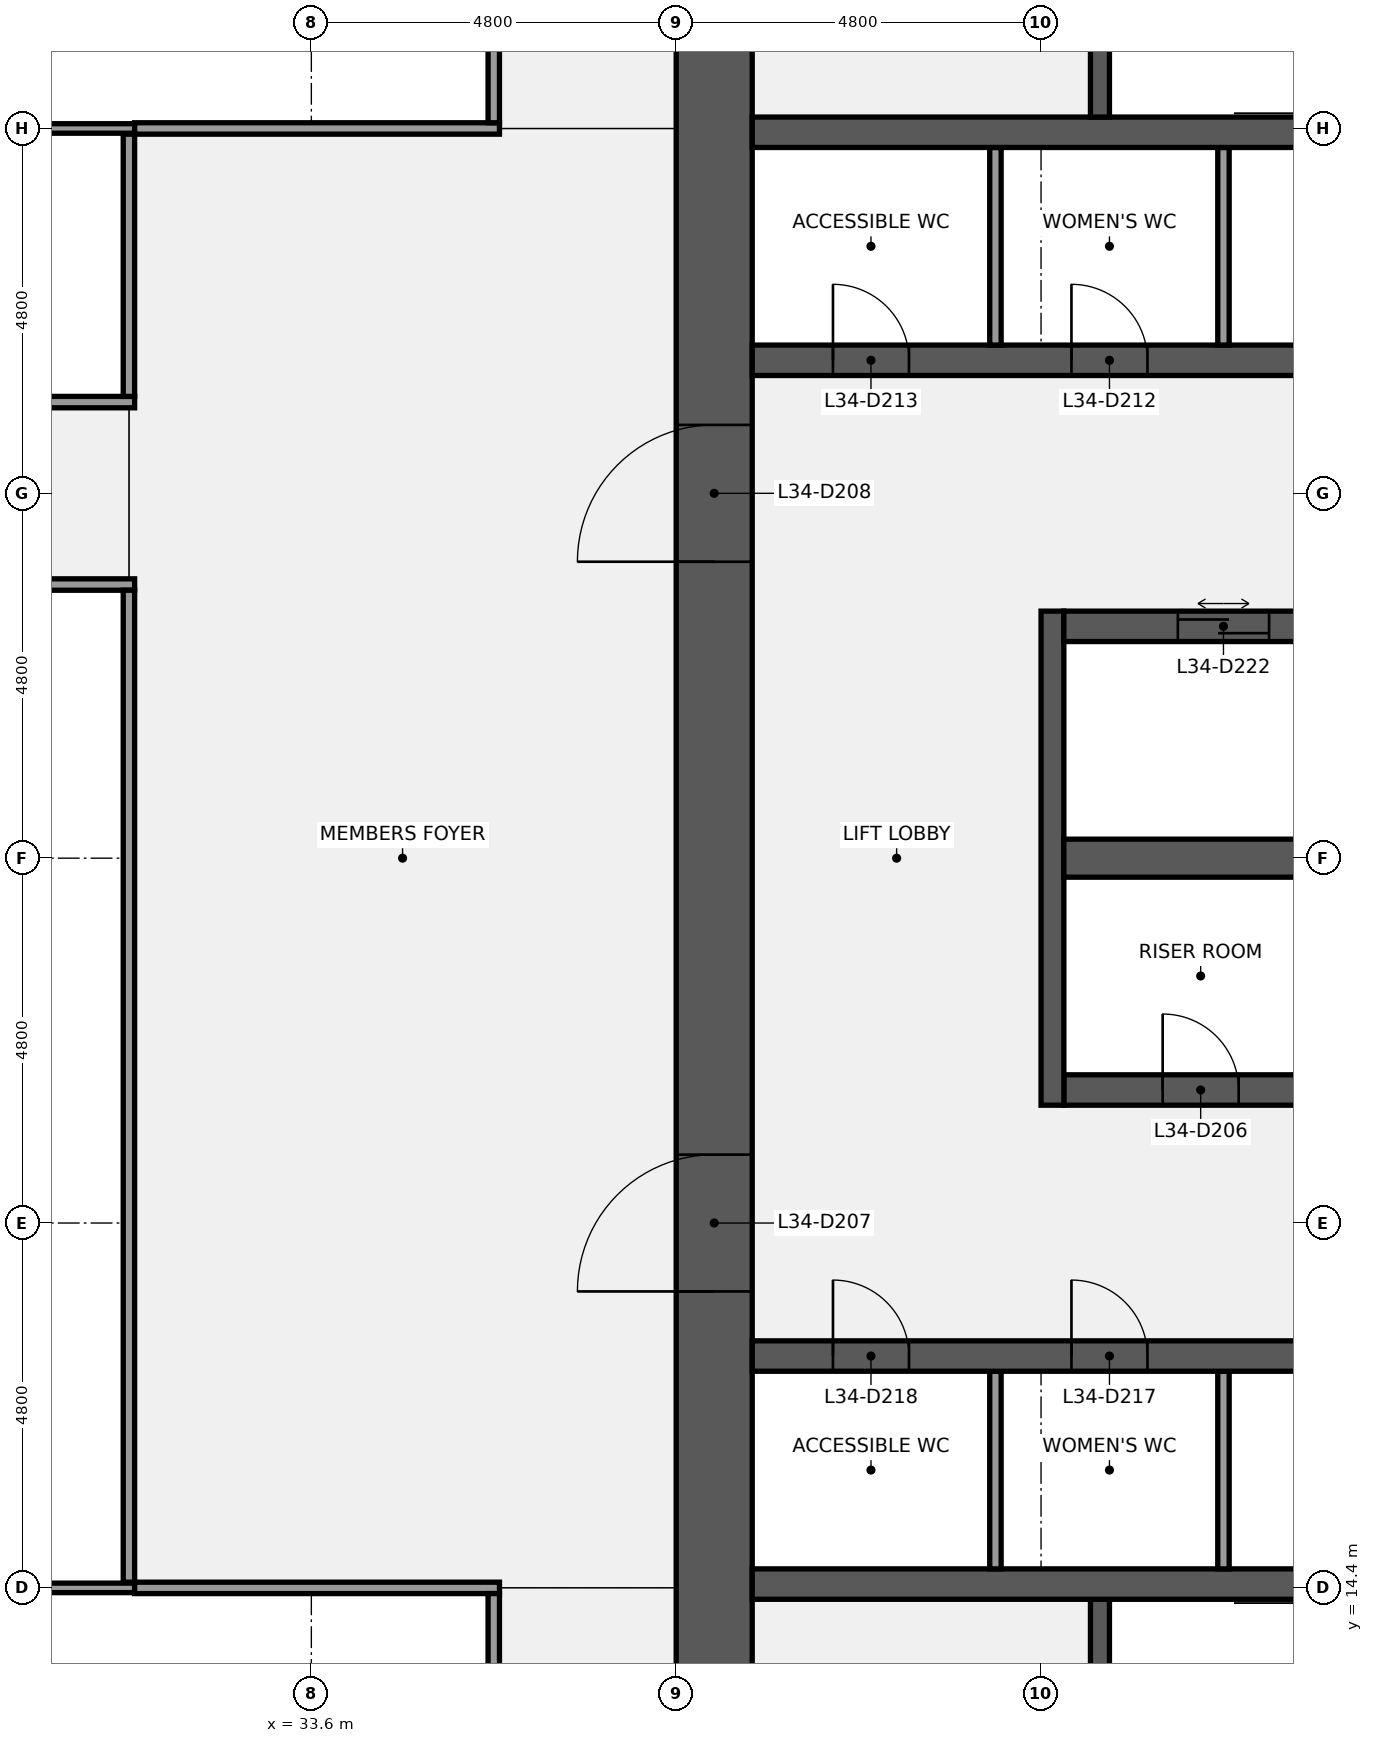
"""IFC4 building model, lengths in metres.
Left out: names, types, materials, properties, quantities, classifications, styles, units other than length and angle.
Written with IfcOpenShell. Run it as: python <this file> out.ifc"""

import sys

from ifc_helpers import new_model, si_unit, direction, frame, frame_2d, origin, place, context, subcontext, project, spatial, rectangle, extrude, element, fill, save


model = new_model("IFC4")
c1 = context("Model", 3, precision=1e-05, world=origin(), true_north=direction((0.0, 1.0)))
c2 = subcontext(c1, "Body", "Model", "MODEL_VIEW")
j1 = project(units=[si_unit("LENGTHUNIT", "METRE"), si_unit("PLANEANGLEUNIT", "RADIAN")], contexts=[c1])
p1 = place(None, origin())
s1 = spatial("IfcSite", under=j1, at=p1, CompositionType="ELEMENT")
p2 = place(p1, origin())
s2 = spatial("IfcBuilding", under=s1, at=p2, CompositionType="ELEMENT")
p3 = place(p2, frame((0.0, 0.0, 156.1)))
s3 = spatial("IfcBuildingStorey", under=s2, at=p3, CompositionType="ELEMENT", Elevation=156.1)
p4 = place(p3, frame((38.9, 9.6, 0.0), z_axis=(0.0, 0.0, 1.0), x_axis=(0.0, 1.0, 0.0)))
e1 = element("IfcWall", 1, at=p4, inside=s3, PredefinedType="SHEAR", context=c2, shape_type="SweptSolid", body=[
    extrude(rectangle(XDim=28.8, YDim=1.0, at=frame_2d((14.4, 0.0))), origin(), (0.0, 0.0, 1.0), 3.84),
])
p5 = place(p4, frame((8.7, 0.0, 0.0)))
e2 = element("IfcOpeningElement", 2, at=p5, cuts=e1, PredefinedType="OPENING", context=c2, shape_type="SweptSolid", body=[
    extrude(rectangle(XDim=1.8, YDim=2.1, at=frame_2d((0.9, 1.05))), frame((0.0, 0.51, 0.0), z_axis=(0.0, -1.0, 0.0), x_axis=(1.0, 0.0, 0.0)), (0.0, 0.0, 1.0), 1.02),
])
p6 = place(p4, frame((18.3, 0.0, 0.0)))
e3 = element("IfcOpeningElement", 3, at=p6, cuts=e1, PredefinedType="OPENING", context=c2, shape_type="SweptSolid", body=[
    extrude(rectangle(XDim=1.8, YDim=2.1, at=frame_2d((0.9, 1.05))), frame((0.0, 0.51, 0.0), z_axis=(0.0, -1.0, 0.0), x_axis=(1.0, 0.0, 0.0)), (0.0, 0.0, 1.0), 1.02),
])
p7 = place(p3, frame((43.975, 10.8, 0.0), z_axis=(0.0, 0.0, 1.0), x_axis=(0.0, 1.0, 0.0)))
e4 = element("IfcWall", 4, at=p7, inside=s3, PredefinedType="SHEAR", context=c2, shape_type="SweptSolid", body=[
    extrude(rectangle(XDim=3.45, YDim=0.25, at=frame_2d((1.725, 0.0))), origin(), (0.0, 0.0, 1.0), 3.84),
])
p8 = place(p7, frame((1.175, 0.0, 0.0)))
e5 = element("IfcOpeningElement", 5, at=p8, cuts=e4, PredefinedType="OPENING", context=c2, shape_type="SweptSolid", body=[
    extrude(rectangle(XDim=1.1, YDim=2.1, at=frame_2d((0.55, 1.05))), frame((0.0, 0.135, 0.0), z_axis=(0.0, -1.0, 0.0), x_axis=(1.0, 0.0, 0.0)), (0.0, 0.0, 1.0), 0.27),
])
p9 = place(p3, frame((39.4, 14.45, 0.0), z_axis=(0.0, 0.0, 1.0), x_axis=(1.0, 0.0, 0.0)))
e6 = element("IfcWall", 6, at=p9, inside=s3, PredefinedType="SHEAR", context=c2, shape_type="SweptSolid", body=[
    extrude(rectangle(XDim=17.2, YDim=0.4, at=frame_2d((8.6, 0.0))), origin(), (0.0, 0.0, 1.0), 3.84),
])
for number, where, z_axis, x_axis in (
    (7, (45.6, 14.65, 0.0), (0.0, 0.0, 1.0), (0.0, 1.0, 0.0)),
    (8, (42.6, 14.65, 0.0), (0.0, 0.0, 1.0), (0.0, 1.0, 0.0)),
):
    element("IfcWall", number, at=place(p3, frame(where, z_axis=z_axis, x_axis=x_axis)), inside=s3, PredefinedType="PARTITIONING", context=c2, shape_type="SweptSolid", body=[
        extrude(rectangle(XDim=2.6, YDim=0.15, at=frame_2d((1.3, 0.0))), origin(), (0.0, 0.0, 1.0), 3.84),
    ])
p10 = place(p3, frame((39.4, 17.45, 0.0), z_axis=(0.0, 0.0, 1.0), x_axis=(1.0, 0.0, 0.0)))
e9 = element("IfcWall", 9, at=p10, inside=s3, PredefinedType="SHEAR", context=c2, shape_type="SweptSolid", body=[
    extrude(rectangle(XDim=17.2, YDim=0.4, at=frame_2d((8.6, 0.0))), origin(), (0.0, 0.0, 1.0), 3.84),
])
p11 = place(p10, frame((15.438, 0.0, 0.0)))
e10 = element("IfcOpeningElement", 10, at=p11, cuts=e9, PredefinedType="OPENING", context=c2, shape_type="SweptSolid", body=[
    extrude(rectangle(XDim=1.0, YDim=2.1, at=frame_2d((0.5, 1.05))), frame((0.0, 0.21, 0.0), z_axis=(0.0, -1.0, 0.0), x_axis=(1.0, 0.0, 0.0)), (0.0, 0.0, 1.0), 0.42),
])
p12 = place(p10, frame((12.9, 0.0, 0.0)))
e11 = element("IfcOpeningElement", 11, at=p12, cuts=e9, PredefinedType="OPENING", context=c2, shape_type="SweptSolid", body=[
    extrude(rectangle(XDim=1.0, YDim=2.1, at=frame_2d((0.5, 1.05))), frame((0.0, 0.21, 0.0), z_axis=(0.0, -1.0, 0.0), x_axis=(1.0, 0.0, 0.0)), (0.0, 0.0, 1.0), 0.42),
])
p13 = place(p10, frame((8.7, 0.0, 0.0)))
e12 = element("IfcOpeningElement", 12, at=p13, cuts=e9, PredefinedType="OPENING", context=c2, shape_type="SweptSolid", body=[
    extrude(rectangle(XDim=1.0, YDim=2.1, at=frame_2d((0.5, 1.05))), frame((0.0, 0.21, 0.0), z_axis=(0.0, -1.0, 0.0), x_axis=(1.0, 0.0, 0.0)), (0.0, 0.0, 1.0), 0.42),
])
p14 = place(p10, frame((4.2, 0.0, 0.0)))
e13 = element("IfcOpeningElement", 13, at=p14, cuts=e9, PredefinedType="OPENING", context=c2, shape_type="SweptSolid", body=[
    extrude(rectangle(XDim=1.0, YDim=2.1, at=frame_2d((0.5, 1.05))), frame((0.0, 0.21, 0.0), z_axis=(0.0, -1.0, 0.0), x_axis=(1.0, 0.0, 0.0)), (0.0, 0.0, 1.0), 0.42),
])
p15 = place(p10, frame((1.062, 0.0, 0.0)))
e14 = element("IfcOpeningElement", 14, at=p15, cuts=e9, PredefinedType="OPENING", context=c2, shape_type="SweptSolid", body=[
    extrude(rectangle(XDim=1.0, YDim=2.1, at=frame_2d((0.5, 1.05))), frame((0.0, 0.21, 0.0), z_axis=(0.0, -1.0, 0.0), x_axis=(1.0, 0.0, 0.0)), (0.0, 0.0, 1.0), 0.42),
])
p16 = place(p3, frame((43.5, 20.95, 0.0), z_axis=(0.0, 0.0, 1.0), x_axis=(1.0, 0.0, 0.0)))
e15 = element("IfcWall", 15, at=p16, inside=s3, PredefinedType="SHEAR", context=c2, shape_type="SweptSolid", body=[
    extrude(rectangle(XDim=13.1, YDim=0.4, at=frame_2d((6.55, 0.0))), origin(), (0.0, 0.0, 1.0), 3.84),
])
p17 = place(p16, frame((6.15, 0.0, 0.0)))
e16 = element("IfcOpeningElement", 16, at=p17, cuts=e15, PredefinedType="OPENING", context=c2, shape_type="SweptSolid", body=[
    extrude(rectangle(XDim=1.1, YDim=2.1, at=frame_2d((0.55, 1.05))), frame((0.0, 0.21, 0.0), z_axis=(0.0, -1.0, 0.0), x_axis=(1.0, 0.0, 0.0)), (0.0, 0.0, 1.0), 0.42),
])
p18 = place(p16, frame((1.3, 0.0, 0.0)))
e17 = element("IfcOpeningElement", 17, at=p18, cuts=e15, PredefinedType="OPENING", context=c2, shape_type="SweptSolid", body=[
    extrude(rectangle(XDim=1.0, YDim=2.1, at=frame_2d((0.5, 1.05))), frame((0.0, 0.21, 0.0), z_axis=(0.0, -1.0, 0.0), x_axis=(1.0, 0.0, 0.0)), (0.0, 0.0, 1.0), 0.42),
])
p19 = place(p3, frame((43.35, 20.75, 0.0), z_axis=(0.0, 0.0, 1.0), x_axis=(0.0, 1.0, 0.0)))
e18 = element("IfcWall", 18, at=p19, inside=s3, PredefinedType="SHEAR", context=c2, shape_type="SweptSolid", body=[
    extrude(rectangle(XDim=6.5, YDim=0.3, at=frame_2d((3.25, 0.0))), origin(), (0.0, 0.0, 1.0), 3.84),
])
p20 = place(p3, frame((43.5, 24.0, 0.0), z_axis=(0.0, 0.0, 1.0), x_axis=(1.0, 0.0, 0.0)))
e19 = element("IfcWall", 19, at=p20, inside=s3, PredefinedType="SHEAR", context=c2, shape_type="SweptSolid", body=[
    extrude(rectangle(XDim=13.1, YDim=0.5, at=frame_2d((6.55, 0.0))), origin(), (0.0, 0.0, 1.0), 3.84),
])
p21 = place(p3, frame((43.5, 27.05, 0.0), z_axis=(0.0, 0.0, 1.0), x_axis=(1.0, 0.0, 0.0)))
e20 = element("IfcWall", 20, at=p21, inside=s3, PredefinedType="SHEAR", context=c2, shape_type="SweptSolid", body=[
    extrude(rectangle(XDim=13.1, YDim=0.4, at=frame_2d((6.55, 0.0))), origin(), (0.0, 0.0, 1.0), 3.84),
])
p22 = place(p21, frame((10.7, 0.0, 0.0)))
e21 = element("IfcOpeningElement", 21, at=p22, cuts=e20, PredefinedType="OPENING", context=c2, shape_type="SweptSolid", body=[
    extrude(rectangle(XDim=1.2, YDim=2.1, at=frame_2d((0.6, 1.05))), frame((0.0, 0.21, 0.0), z_axis=(0.0, -1.0, 0.0), x_axis=(1.0, 0.0, 0.0)), (0.0, 0.0, 1.0), 0.42),
])
p23 = place(p21, frame((8.1, 0.0, 0.0)))
e22 = element("IfcOpeningElement", 22, at=p23, cuts=e20, PredefinedType="OPENING", context=c2, shape_type="SweptSolid", body=[
    extrude(rectangle(XDim=1.2, YDim=2.1, at=frame_2d((0.6, 1.05))), frame((0.0, 0.21, 0.0), z_axis=(0.0, -1.0, 0.0), x_axis=(1.0, 0.0, 0.0)), (0.0, 0.0, 1.0), 0.42),
])
p24 = place(p21, frame((5.5, 0.0, 0.0)))
e23 = element("IfcOpeningElement", 23, at=p24, cuts=e20, PredefinedType="OPENING", context=c2, shape_type="SweptSolid", body=[
    extrude(rectangle(XDim=1.2, YDim=2.1, at=frame_2d((0.6, 1.05))), frame((0.0, 0.21, 0.0), z_axis=(0.0, -1.0, 0.0), x_axis=(1.0, 0.0, 0.0)), (0.0, 0.0, 1.0), 0.42),
])
p25 = place(p21, frame((1.5, 0.0, 0.0)))
e24 = element("IfcOpeningElement", 24, at=p25, cuts=e20, PredefinedType="OPENING", context=c2, shape_type="SweptSolid", body=[
    extrude(rectangle(XDim=1.2, YDim=2.1, at=frame_2d((0.6, 1.05))), frame((0.0, 0.21, 0.0), z_axis=(0.0, -1.0, 0.0), x_axis=(1.0, 0.0, 0.0)), (0.0, 0.0, 1.0), 0.42),
])
p26 = place(p3, frame((39.4, 30.55, 0.0), z_axis=(0.0, 0.0, 1.0), x_axis=(1.0, 0.0, 0.0)))
e25 = element("IfcWall", 25, at=p26, inside=s3, PredefinedType="SHEAR", context=c2, shape_type="SweptSolid", body=[
    extrude(rectangle(XDim=17.2, YDim=0.4, at=frame_2d((8.6, 0.0))), origin(), (0.0, 0.0, 1.0), 3.84),
])
p27 = place(p26, frame((15.438, 0.0, 0.0)))
e26 = element("IfcOpeningElement", 26, at=p27, cuts=e25, PredefinedType="OPENING", context=c2, shape_type="SweptSolid", body=[
    extrude(rectangle(XDim=1.0, YDim=2.1, at=frame_2d((0.5, 1.05))), frame((0.0, 0.21, 0.0), z_axis=(0.0, -1.0, 0.0), x_axis=(1.0, 0.0, 0.0)), (0.0, 0.0, 1.0), 0.42),
])
p28 = place(p26, frame((12.9, 0.0, 0.0)))
e27 = element("IfcOpeningElement", 27, at=p28, cuts=e25, PredefinedType="OPENING", context=c2, shape_type="SweptSolid", body=[
    extrude(rectangle(XDim=1.0, YDim=2.1, at=frame_2d((0.5, 1.05))), frame((0.0, 0.21, 0.0), z_axis=(0.0, -1.0, 0.0), x_axis=(1.0, 0.0, 0.0)), (0.0, 0.0, 1.0), 0.42),
])
p29 = place(p26, frame((8.7, 0.0, 0.0)))
e28 = element("IfcOpeningElement", 28, at=p29, cuts=e25, PredefinedType="OPENING", context=c2, shape_type="SweptSolid", body=[
    extrude(rectangle(XDim=1.0, YDim=2.1, at=frame_2d((0.5, 1.05))), frame((0.0, 0.21, 0.0), z_axis=(0.0, -1.0, 0.0), x_axis=(1.0, 0.0, 0.0)), (0.0, 0.0, 1.0), 0.42),
])
p30 = place(p26, frame((4.2, 0.0, 0.0)))
e29 = element("IfcOpeningElement", 29, at=p30, cuts=e25, PredefinedType="OPENING", context=c2, shape_type="SweptSolid", body=[
    extrude(rectangle(XDim=1.0, YDim=2.1, at=frame_2d((0.5, 1.05))), frame((0.0, 0.21, 0.0), z_axis=(0.0, -1.0, 0.0), x_axis=(1.0, 0.0, 0.0)), (0.0, 0.0, 1.0), 0.42),
])
p31 = place(p26, frame((1.062, 0.0, 0.0)))
e30 = element("IfcOpeningElement", 30, at=p31, cuts=e25, PredefinedType="OPENING", context=c2, shape_type="SweptSolid", body=[
    extrude(rectangle(XDim=1.0, YDim=2.1, at=frame_2d((0.5, 1.05))), frame((0.0, 0.21, 0.0), z_axis=(0.0, -1.0, 0.0), x_axis=(1.0, 0.0, 0.0)), (0.0, 0.0, 1.0), 0.42),
])
for number, where, z_axis, x_axis in (
    (31, (45.6, 30.75, 0.0), (0.0, 0.0, 1.0), (0.0, 1.0, 0.0)),
    (32, (42.6, 30.75, 0.0), (0.0, 0.0, 1.0), (0.0, 1.0, 0.0)),
):
    element("IfcWall", number, at=place(p3, frame(where, z_axis=z_axis, x_axis=x_axis)), inside=s3, PredefinedType="PARTITIONING", context=c2, shape_type="SweptSolid", body=[
        extrude(rectangle(XDim=2.6, YDim=0.15, at=frame_2d((1.3, 0.0))), origin(), (0.0, 0.0, 1.0), 3.84),
    ])
p32 = place(p3, frame((39.4, 33.55, 0.0), z_axis=(0.0, 0.0, 1.0), x_axis=(1.0, 0.0, 0.0)))
e33 = element("IfcWall", 33, at=p32, inside=s3, PredefinedType="SHEAR", context=c2, shape_type="SweptSolid", body=[
    extrude(rectangle(XDim=17.2, YDim=0.4, at=frame_2d((8.6, 0.0))), origin(), (0.0, 0.0, 1.0), 3.84),
])
p33 = place(p3, frame((43.975, 33.75, 0.0), z_axis=(0.0, 0.0, 1.0), x_axis=(0.0, 1.0, 0.0)))
e34 = element("IfcWall", 34, at=p33, inside=s3, PredefinedType="SHEAR", context=c2, shape_type="SweptSolid", body=[
    extrude(rectangle(XDim=3.45, YDim=0.25, at=frame_2d((1.725, 0.0))), origin(), (0.0, 0.0, 1.0), 3.84),
])
p34 = place(p33, frame((1.175, 0.0, 0.0)))
e35 = element("IfcOpeningElement", 35, at=p34, cuts=e34, PredefinedType="OPENING", context=c2, shape_type="SweptSolid", body=[
    extrude(rectangle(XDim=1.1, YDim=2.1, at=frame_2d((0.55, 1.05))), frame((0.0, 0.135, 0.0), z_axis=(0.0, -1.0, 0.0), x_axis=(1.0, 0.0, 0.0)), (0.0, 0.0, 1.0), 0.27),
])
p35 = place(p3, frame((26.475, 14.4, 0.0), z_axis=(0.0, 0.0, 1.0), x_axis=(1.0, 0.0, 0.0)))
e36 = element("IfcWall", 36, at=p35, inside=s3, PredefinedType="PARTITIONING", context=c2, shape_type="SweptSolid", body=[
    extrude(rectangle(XDim=4.8, YDim=0.125, at=frame_2d((2.4, 0.0))), origin(), (0.0, 0.0, 1.0), 2.936),
])
p36 = place(p3, frame((31.275, 14.4, 0.0), z_axis=(0.0, 0.0, 1.0), x_axis=(1.0, 0.0, 0.0)))
e37 = element("IfcWall", 37, at=p36, inside=s3, PredefinedType="PARTITIONING", context=c2, shape_type="SweptSolid", body=[
    extrude(rectangle(XDim=4.8, YDim=0.15, at=frame_2d((2.4, 0.0))), origin(), (0.0, 0.0, 1.0), 2.936),
])
p37 = place(p3, frame((26.325, 27.6, 0.0), z_axis=(0.0, 0.0, 1.0), x_axis=(1.0, 0.0, 0.0)))
e38 = element("IfcWall", 38, at=p37, inside=s3, PredefinedType="PARTITIONING", context=c2, shape_type="SweptSolid", body=[
    extrude(rectangle(XDim=4.95, YDim=0.15, at=frame_2d((2.475, 0.0))), origin(), (0.0, 0.0, 1.0), 2.936),
])
p38 = place(p3, frame((26.325, 30.0, 0.0), z_axis=(0.0, 0.0, 1.0), x_axis=(1.0, 0.0, 0.0)))
e39 = element("IfcWall", 39, at=p38, inside=s3, PredefinedType="PARTITIONING", context=c2, shape_type="SweptSolid", body=[
    extrude(rectangle(XDim=4.95, YDim=0.15, at=frame_2d((2.475, 0.0))), origin(), (0.0, 0.0, 1.0), 2.936),
])
p39 = place(p38, frame((1.975, 0.0, 0.0)))
e40 = element("IfcOpeningElement", 40, at=p39, cuts=e39, PredefinedType="OPENING", context=c2, shape_type="SweptSolid", body=[
    extrude(rectangle(XDim=1.0, YDim=2.1, at=frame_2d((0.5, 1.05))), frame((0.0, 0.085, 0.0), z_axis=(0.0, -1.0, 0.0), x_axis=(1.0, 0.0, 0.0)), (0.0, 0.0, 1.0), 0.17),
])
p40 = place(p3, frame((26.475, 33.6, 0.0), z_axis=(0.0, 0.0, 1.0), x_axis=(1.0, 0.0, 0.0)))
e41 = element("IfcWall", 41, at=p40, inside=s3, PredefinedType="PARTITIONING", context=c2, shape_type="SweptSolid", body=[
    extrude(rectangle(XDim=4.8, YDim=0.125, at=frame_2d((2.4, 0.0))), origin(), (0.0, 0.0, 1.0), 2.936),
])
p41 = place(p3, frame((31.275, 33.6, 0.0), z_axis=(0.0, 0.0, 1.0), x_axis=(1.0, 0.0, 0.0)))
e42 = element("IfcWall", 42, at=p41, inside=s3, PredefinedType="PARTITIONING", context=c2, shape_type="SweptSolid", body=[
    extrude(rectangle(XDim=4.8, YDim=0.15, at=frame_2d((2.4, 0.0))), origin(), (0.0, 0.0, 1.0), 2.936),
])
p42 = place(p3, frame((31.2, 14.475, 0.0), z_axis=(0.0, 0.0, 1.0), x_axis=(0.0, 1.0, 0.0)))
e43 = element("IfcWall", 43, at=p42, inside=s3, PredefinedType="PARTITIONING", context=c2, shape_type="SweptSolid", body=[
    extrude(rectangle(XDim=13.05, YDim=0.15, at=frame_2d((6.525, 0.0))), origin(), (0.0, 0.0, 1.0), 2.936),
])
p43 = place(p3, frame((31.2, 30.075, 0.0), z_axis=(0.0, 0.0, 1.0), x_axis=(0.0, 1.0, 0.0)))
e44 = element("IfcWall", 44, at=p43, inside=s3, PredefinedType="PARTITIONING", context=c2, shape_type="SweptSolid", body=[
    extrude(rectangle(XDim=3.45, YDim=0.15, at=frame_2d((1.725, 0.0))), origin(), (0.0, 0.0, 1.0), 2.936),
])
for number, where, z_axis, x_axis in (
    (45, (36.0, 9.675, 0.0), (0.0, 0.0, 1.0), (0.0, 1.0, 0.0)),
    (46, (36.0, 33.675, 0.0), (0.0, 0.0, 1.0), (0.0, 1.0, 0.0)),
):
    element("IfcWall", number, at=place(p3, frame(where, z_axis=z_axis, x_axis=x_axis)), inside=s3, PredefinedType="PARTITIONING", context=c2, shape_type="SweptSolid", body=[
        extrude(rectangle(XDim=4.65, YDim=0.15, at=frame_2d((2.325, 0.0))), origin(), (0.0, 0.0, 1.0), 2.936),
    ])
p44 = place(p18, origin())
e47 = element("IfcDoor", 47, at=p44, inside=s3, OperationType="SINGLE_SWING_LEFT", PredefinedType="DOOR", context=c2, shape_type="SweptSolid", body=[
    extrude(rectangle(XDim=1.0, YDim=2.1, at=frame_2d((0.5, 1.05))), frame((0.0, 0.025, 0.0), z_axis=(0.0, -1.0, 0.0), x_axis=(1.0, 0.0, 0.0)), (0.0, 0.0, 1.0), 0.05),
])
fill(e17, e47)
p45 = place(p5, origin())
e48 = element("IfcDoor", 48, at=p45, inside=s3, OperationType="DOUBLE_DOOR_SINGLE_SWING", PredefinedType="DOOR", context=c2, shape_type="SweptSolid", body=[
    extrude(rectangle(XDim=1.8, YDim=2.1, at=frame_2d((0.9, 1.05))), frame((0.0, 0.025, 0.0), z_axis=(0.0, -1.0, 0.0), x_axis=(1.0, 0.0, 0.0)), (0.0, 0.0, 1.0), 0.05),
])
fill(e2, e48)
p46 = place(p6, origin())
e49 = element("IfcDoor", 49, at=p46, inside=s3, OperationType="DOUBLE_DOOR_SINGLE_SWING", PredefinedType="DOOR", context=c2, shape_type="SweptSolid", body=[
    extrude(rectangle(XDim=1.8, YDim=2.1, at=frame_2d((0.9, 1.05))), frame((0.0, 0.025, 0.0), z_axis=(0.0, -1.0, 0.0), x_axis=(1.0, 0.0, 0.0)), (0.0, 0.0, 1.0), 0.05),
])
fill(e3, e49)
p47 = place(p30, origin())
e50 = element("IfcDoor", 50, at=p47, inside=s3, OperationType="SINGLE_SWING_LEFT", PredefinedType="DOOR", context=c2, shape_type="SweptSolid", body=[
    extrude(rectangle(XDim=1.0, YDim=2.1, at=frame_2d((0.5, 1.05))), frame((0.0, 0.025, 0.0), z_axis=(0.0, -1.0, 0.0), x_axis=(1.0, 0.0, 0.0)), (0.0, 0.0, 1.0), 0.05),
])
fill(e29, e50)
p48 = place(p31, origin())
e51 = element("IfcDoor", 51, at=p48, inside=s3, OperationType="SINGLE_SWING_LEFT", PredefinedType="DOOR", context=c2, shape_type="SweptSolid", body=[
    extrude(rectangle(XDim=1.0, YDim=2.1, at=frame_2d((0.5, 1.05))), frame((0.0, 0.025, 0.0), z_axis=(0.0, -1.0, 0.0), x_axis=(1.0, 0.0, 0.0)), (0.0, 0.0, 1.0), 0.05),
])
fill(e30, e51)
p49 = place(p14, origin())
e52 = element("IfcDoor", 52, at=p49, inside=s3, OperationType="SINGLE_SWING_LEFT", PredefinedType="DOOR", context=c2, shape_type="SweptSolid", body=[
    extrude(rectangle(XDim=1.0, YDim=2.1, at=frame_2d((0.5, 1.05))), frame((0.0, 0.025, 0.0), z_axis=(0.0, -1.0, 0.0), x_axis=(1.0, 0.0, 0.0)), (0.0, 0.0, 1.0), 0.05),
])
fill(e13, e52)
p50 = place(p15, origin())
e53 = element("IfcDoor", 53, at=p50, inside=s3, OperationType="SINGLE_SWING_LEFT", PredefinedType="DOOR", context=c2, shape_type="SweptSolid", body=[
    extrude(rectangle(XDim=1.0, YDim=2.1, at=frame_2d((0.5, 1.05))), frame((0.0, 0.025, 0.0), z_axis=(0.0, -1.0, 0.0), x_axis=(1.0, 0.0, 0.0)), (0.0, 0.0, 1.0), 0.05),
])
fill(e14, e53)
p51 = place(p25, origin())
e54 = element("IfcDoor", 54, at=p51, inside=s3, OperationType="DOUBLE_DOOR_SLIDING", PredefinedType="DOOR", context=c2, shape_type="SweptSolid", body=[
    extrude(rectangle(XDim=1.2, YDim=2.1, at=frame_2d((0.6, 1.05))), frame((0.0, 0.025, 0.0), z_axis=(0.0, -1.0, 0.0), x_axis=(1.0, 0.0, 0.0)), (0.0, 0.0, 1.0), 0.05),
])
fill(e24, e54)
save(model, sys.argv[1])
